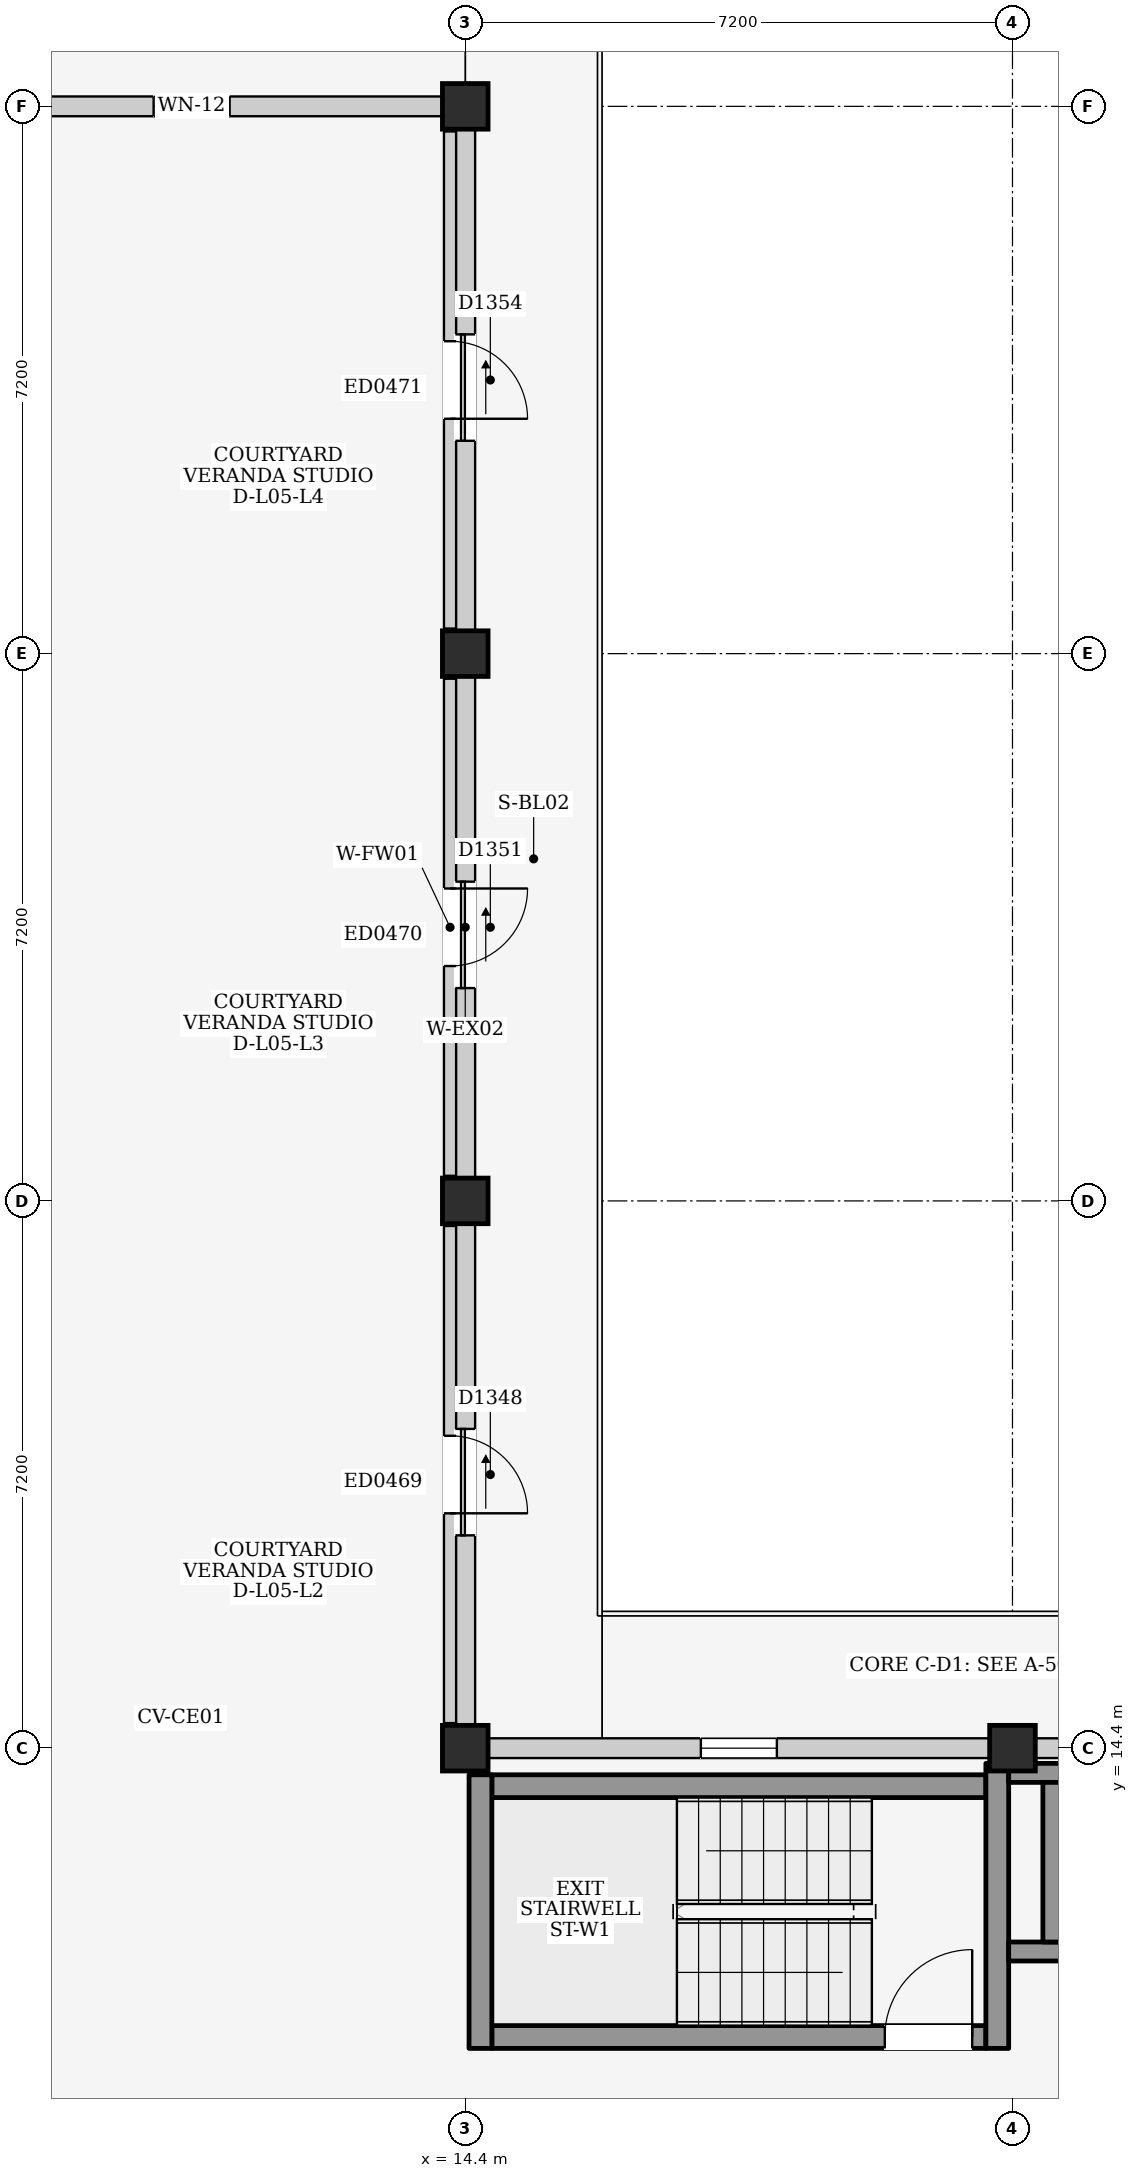
"""IFC4 building model, lengths in metres.
Left out: names, types, materials, properties, quantities, classifications, styles, units other than length and angle.
Written with IfcOpenShell. Run it as: python <this file> out.ifc"""

import sys

from ifc_helpers import new_model, si_unit, direction, frame, frame_2d, origin, origin_2d, place, context, subcontext, project, spatial, rectangle, extrude, element, fill, save


model = new_model("IFC4")
c1 = context("Model", 3, precision=1e-05, world=origin(), true_north=direction((0.0, 1.0)))
c2 = subcontext(c1, "Body", "Model", "MODEL_VIEW")
j1 = project(units=[si_unit("LENGTHUNIT", "METRE"), si_unit("PLANEANGLEUNIT", "RADIAN")], contexts=[c1])
p1 = place(None, origin())
s1 = spatial("IfcSite", under=j1, at=p1, CompositionType="ELEMENT")
p2 = place(p1, origin())
s2 = spatial("IfcBuilding", under=s1, at=p2, CompositionType="ELEMENT")
p3 = place(p2, frame((0.0, 0.0, 18.6)))
s3 = spatial("IfcBuildingStorey", under=s2, at=p3, CompositionType="ELEMENT", Elevation=18.6)
for number, where, z_axis, x_axis in (
    (1, (14.4, 14.4, 0.0), (0.0, 0.0, 1.0), (1.0, 0.0, 0.0)),
    (2, (14.4, 21.6, 0.0), (0.0, 0.0, 1.0), (1.0, 0.0, 0.0)),
    (3, (14.4, 28.8, 0.0), (0.0, 0.0, 1.0), (1.0, 0.0, 0.0)),
    (4, (14.4, 36.0, 0.0), (0.0, 0.0, 1.0), (1.0, 0.0, 0.0)),
    (5, (21.6, 14.4, 0.0), (0.0, 0.0, 1.0), (1.0, 0.0, 0.0)),
):
    element("IfcColumn", number, at=place(p3, frame(where, z_axis=z_axis, x_axis=x_axis)), inside=s3, PredefinedType="COLUMN", context=c2, shape_type="SweptSolid", body=[
        extrude(rectangle(XDim=0.6, YDim=0.6, at=origin_2d()), origin(), (0.0, 0.0, 1.0), 3.3),
    ])
p4 = place(p3, frame((14.4, 14.7, 0.0), z_axis=(0.0, 0.0, 1.0), x_axis=(0.0, 1.0, 0.0)))
e6 = element("IfcWall", 6, at=p4, inside=s3, PredefinedType="ELEMENTEDWALL", context=c2, shape_type="SweptSolid", body=[
    extrude(rectangle(XDim=6.6, YDim=0.26, at=frame_2d((3.3, 0.0))), origin(), (0.0, 0.0, 1.0), 2.545),
])
p5 = place(p4, frame((2.5, 0.0, 0.0)))
e7 = element("IfcOpeningElement", 7, at=p5, cuts=e6, PredefinedType="OPENING", context=c2, shape_type="SweptSolid", body=[
    extrude(rectangle(XDim=1.4, YDim=2.1, at=frame_2d((0.7, 1.05))), frame((0.0, 0.145, 0.0), z_axis=(0.0, -1.0, 0.0), x_axis=(1.0, 0.0, 0.0)), (0.0, 0.0, 1.0), 0.29),
])
p6 = place(p3, frame((14.4, 21.9, 0.0), z_axis=(0.0, 0.0, 1.0), x_axis=(0.0, 1.0, 0.0)))
e8 = element("IfcWall", 8, at=p6, inside=s3, PredefinedType="ELEMENTEDWALL", context=c2, shape_type="SweptSolid", body=[
    extrude(rectangle(XDim=6.6, YDim=0.26, at=frame_2d((3.3, 0.0))), origin(), (0.0, 0.0, 1.0), 2.545),
])
p7 = place(p6, frame((2.5, 0.0, 0.0)))
e9 = element("IfcOpeningElement", 9, at=p7, cuts=e8, PredefinedType="OPENING", context=c2, shape_type="SweptSolid", body=[
    extrude(rectangle(XDim=1.4, YDim=2.1, at=frame_2d((0.7, 1.05))), frame((0.0, 0.145, 0.0), z_axis=(0.0, -1.0, 0.0), x_axis=(1.0, 0.0, 0.0)), (0.0, 0.0, 1.0), 0.29),
])
p8 = place(p3, frame((7.5, 36.0, 0.0), z_axis=(0.0, 0.0, 1.0), x_axis=(1.0, 0.0, 0.0)))
e10 = element("IfcWall", 10, at=p8, inside=s3, PredefinedType="ELEMENTEDWALL", context=c2, shape_type="SweptSolid", body=[
    extrude(rectangle(XDim=6.6, YDim=0.26, at=frame_2d((3.3, 0.0))), origin(), (0.0, 0.0, 1.0), 2.445),
])
p9 = place(p8, frame((2.8, 0.0, 1.1)))
e11 = element("IfcOpeningElement", 11, at=p9, cuts=e10, PredefinedType="OPENING", context=c2, shape_type="SweptSolid", body=[
    extrude(rectangle(XDim=1.0, YDim=0.9, at=frame_2d((0.5, 0.45))), frame((0.0, 0.145, 0.0), z_axis=(0.0, -1.0, 0.0), x_axis=(1.0, 0.0, 0.0)), (0.0, 0.0, 1.0), 0.29),
])
p10 = place(p3, frame((14.4, 29.1, 0.0), z_axis=(0.0, 0.0, 1.0), x_axis=(0.0, 1.0, 0.0)))
e12 = element("IfcWall", 12, at=p10, inside=s3, PredefinedType="ELEMENTEDWALL", context=c2, shape_type="SweptSolid", body=[
    extrude(rectangle(XDim=6.6, YDim=0.26, at=frame_2d((3.3, 0.0))), origin(), (0.0, 0.0, 1.0), 2.545),
])
p11 = place(p10, frame((2.5, 0.0, 0.0)))
e13 = element("IfcOpeningElement", 13, at=p11, cuts=e12, PredefinedType="OPENING", context=c2, shape_type="SweptSolid", body=[
    extrude(rectangle(XDim=1.4, YDim=2.1, at=frame_2d((0.7, 1.05))), frame((0.0, 0.145, 0.0), z_axis=(0.0, -1.0, 0.0), x_axis=(1.0, 0.0, 0.0)), (0.0, 0.0, 1.0), 0.29),
])
p12 = place(p3, frame((14.7, 14.4, 0.0), z_axis=(0.0, 0.0, 1.0), x_axis=(1.0, 0.0, 0.0)))
e14 = element("IfcWall", 14, at=p12, inside=s3, PredefinedType="ELEMENTEDWALL", context=c2, shape_type="SweptSolid", body=[
    extrude(rectangle(XDim=6.6, YDim=0.26, at=frame_2d((3.3, 0.0))), origin(), (0.0, 0.0, 1.0), 2.445),
])
p13 = place(p12, frame((2.8, 0.0, 1.2)))
e15 = element("IfcOpeningElement", 15, at=p13, cuts=e14, PredefinedType="OPENING", context=c2, shape_type="SweptSolid", body=[
    extrude(rectangle(XDim=1.0, YDim=0.9, at=frame_2d((0.5, 0.45))), frame((0.0, 0.145, 0.0), z_axis=(0.0, -1.0, 0.0), x_axis=(1.0, 0.0, 0.0)), (0.0, 0.0, 1.0), 0.29),
])
p14 = place(p3, frame((21.9, 14.4, 0.0), z_axis=(0.0, 0.0, 1.0), x_axis=(1.0, 0.0, 0.0)))
e16 = element("IfcWall", 16, at=p14, inside=s3, PredefinedType="ELEMENTEDWALL", context=c2, shape_type="SweptSolid", body=[
    extrude(rectangle(XDim=6.6, YDim=0.26, at=frame_2d((3.3, 0.0))), origin(), (0.0, 0.0, 1.0), 2.445),
])
p15 = place(p14, frame((2.8, 0.0, 1.2)))
e17 = element("IfcOpeningElement", 17, at=p15, cuts=e16, PredefinedType="OPENING", context=c2, shape_type="SweptSolid", body=[
    extrude(rectangle(XDim=1.0, YDim=0.9, at=frame_2d((0.5, 0.45))), frame((0.0, 0.145, 0.0), z_axis=(0.0, -1.0, 0.0), x_axis=(1.0, 0.0, 0.0)), (0.0, 0.0, 1.0), 0.29),
])
p16 = place(p3, frame((14.75, 10.6, 0.0), z_axis=(0.0, 0.0, 1.0), x_axis=(1.0, 0.0, 0.0)))
e18 = element("IfcWall", 18, at=p16, inside=s3, PredefinedType="SHEAR", context=c2, shape_type="SweptSolid", body=[
    extrude(rectangle(XDim=6.5, YDim=0.3, at=frame_2d((3.25, 0.0))), origin(), (0.0, 0.0, 1.0), 3.06),
])
p17 = place(p16, frame((5.17, 0.0, 0.0)))
e19 = element("IfcOpeningElement", 19, at=p17, cuts=e18, PredefinedType="OPENING", context=c2, shape_type="SweptSolid", body=[
    extrude(rectangle(XDim=1.15, YDim=2.2, at=frame_2d((0.575, 1.1))), frame((0.0, 0.165, 0.0), z_axis=(0.0, -1.0, 0.0), x_axis=(1.0, 0.0, 0.0)), (0.0, 0.0, 1.0), 0.33),
])
p18 = place(p3, frame((14.75, 13.9, 0.0), z_axis=(0.0, 0.0, 1.0), x_axis=(1.0, 0.0, 0.0)))
e20 = element("IfcWall", 20, at=p18, inside=s3, PredefinedType="SHEAR", context=c2, shape_type="SweptSolid", body=[
    extrude(rectangle(XDim=6.5, YDim=0.3, at=frame_2d((3.25, 0.0))), origin(), (0.0, 0.0, 1.0), 3.06),
])
p19 = place(p3, frame((14.6, 10.45, 0.0), z_axis=(0.0, 0.0, 1.0), x_axis=(0.0, 1.0, 0.0)))
e21 = element("IfcWall", 21, at=p19, inside=s3, PredefinedType="SHEAR", context=c2, shape_type="SweptSolid", body=[
    extrude(rectangle(XDim=3.6, YDim=0.3, at=frame_2d((1.8, 0.0))), origin(), (0.0, 0.0, 1.0), 3.06),
])
p20 = place(p3, frame((21.4, 10.45, 0.0), z_axis=(0.0, 0.0, 1.0), x_axis=(0.0, 1.0, 0.0)))
e22 = element("IfcWall", 22, at=p20, inside=s3, PredefinedType="SHEAR", context=c2, shape_type="SweptSolid", body=[
    extrude(rectangle(XDim=3.75, YDim=0.3, at=frame_2d((1.875, 0.0))), origin(), (0.0, 0.0, 1.0), 3.06),
])
p21 = place(p3, frame((21.55, 11.725, 0.0), z_axis=(0.0, 0.0, 1.0), x_axis=(1.0, 0.0, 0.0)))
e23 = element("IfcWall", 23, at=p21, inside=s3, PredefinedType="SHEAR", context=c2, shape_type="SweptSolid", body=[
    extrude(rectangle(XDim=2.55, YDim=0.25, at=frame_2d((1.275, 0.0))), origin(), (0.0, 0.0, 1.0), 3.06),
])
p22 = place(p21, frame((0.95, 0.0, 0.0)))
e24 = element("IfcOpeningElement", 24, at=p22, cuts=e23, PredefinedType="OPENING", context=c2, shape_type="SweptSolid", body=[
    extrude(rectangle(XDim=1.1, YDim=2.15, at=frame_2d((0.55, 1.075))), frame((0.0, 0.14, 0.0), z_axis=(0.0, -1.0, 0.0), x_axis=(1.0, 0.0, 0.0)), (0.0, 0.0, 1.0), 0.28),
])
p23 = place(p3, frame((21.55, 14.075, 0.0), z_axis=(0.0, 0.0, 1.0), x_axis=(1.0, 0.0, 0.0)))
e25 = element("IfcWall", 25, at=p23, inside=s3, PredefinedType="SHEAR", context=c2, shape_type="SweptSolid", body=[
    extrude(rectangle(XDim=2.55, YDim=0.25, at=frame_2d((1.275, 0.0))), origin(), (0.0, 0.0, 1.0), 3.06),
])
p24 = place(p3, frame((22.125, 11.85, 0.0), z_axis=(0.0, 0.0, 1.0), x_axis=(0.0, 1.0, 0.0)))
e26 = element("IfcWall", 26, at=p24, inside=s3, PredefinedType="SHEAR", context=c2, shape_type="SweptSolid", body=[
    extrude(rectangle(XDim=2.1, YDim=0.25, at=frame_2d((1.05, 0.0))), origin(), (0.0, 0.0, 1.0), 3.06),
])
p25 = place(p3, frame((14.2, 14.73, 0.0), z_axis=(0.0, 0.0, 1.0), x_axis=(0.0, 1.0, 0.0)))
e27 = element("IfcWall", 27, at=p25, inside=s3, PredefinedType="PARTITIONING", context=c2, shape_type="SweptSolid", body=[
    extrude(rectangle(XDim=6.54, YDim=0.16, at=frame_2d((3.27, 0.0))), origin(), (0.0, 0.0, 1.0), 3.06),
])
p26 = place(p25, frame((2.76, 0.0, 0.0)))
e28 = element("IfcOpeningElement", 28, at=p26, cuts=e27, PredefinedType="OPENING", context=c2, shape_type="SweptSolid", body=[
    extrude(rectangle(XDim=1.02, YDim=2.18, at=frame_2d((0.51, 1.09))), frame((0.0, 0.095, 0.0), z_axis=(0.0, -1.0, 0.0), x_axis=(1.0, 0.0, 0.0)), (0.0, 0.0, 1.0), 0.19),
])
p27 = place(p3, frame((14.2, 21.93, 0.0), z_axis=(0.0, 0.0, 1.0), x_axis=(0.0, 1.0, 0.0)))
e29 = element("IfcWall", 29, at=p27, inside=s3, PredefinedType="PARTITIONING", context=c2, shape_type="SweptSolid", body=[
    extrude(rectangle(XDim=6.54, YDim=0.16, at=frame_2d((3.27, 0.0))), origin(), (0.0, 0.0, 1.0), 3.06),
])
p28 = place(p27, frame((2.76, 0.0, 0.0)))
e30 = element("IfcOpeningElement", 30, at=p28, cuts=e29, PredefinedType="OPENING", context=c2, shape_type="SweptSolid", body=[
    extrude(rectangle(XDim=1.02, YDim=2.18, at=frame_2d((0.51, 1.09))), frame((0.0, 0.095, 0.0), z_axis=(0.0, -1.0, 0.0), x_axis=(1.0, 0.0, 0.0)), (0.0, 0.0, 1.0), 0.19),
])
p29 = place(p3, frame((14.2, 29.13, 0.0), z_axis=(0.0, 0.0, 1.0), x_axis=(0.0, 1.0, 0.0)))
e31 = element("IfcWall", 31, at=p29, inside=s3, PredefinedType="PARTITIONING", context=c2, shape_type="SweptSolid", body=[
    extrude(rectangle(XDim=6.54, YDim=0.16, at=frame_2d((3.27, 0.0))), origin(), (0.0, 0.0, 1.0), 3.06),
])
p30 = place(p29, frame((2.76, 0.0, 0.0)))
e32 = element("IfcOpeningElement", 32, at=p30, cuts=e31, PredefinedType="OPENING", context=c2, shape_type="SweptSolid", body=[
    extrude(rectangle(XDim=1.02, YDim=2.18, at=frame_2d((0.51, 1.09))), frame((0.0, 0.095, 0.0), z_axis=(0.0, -1.0, 0.0), x_axis=(1.0, 0.0, 0.0)), (0.0, 0.0, 1.0), 0.19),
])
p31 = place(p5, frame((1.4, 0.0, 0.0), z_axis=(0.0, 0.0, 1.0), x_axis=(-1.0, 0.0, 0.0)))
e33 = element("IfcDoor", 33, at=p31, inside=s3, OperationType="SLIDING_TO_RIGHT", PredefinedType="DOOR", context=c2, shape_type="SweptSolid", body=[
    extrude(rectangle(XDim=1.4, YDim=2.1, at=frame_2d((0.7, 1.05))), frame((0.0, 0.025, 0.0), z_axis=(0.0, -1.0, 0.0), x_axis=(1.0, 0.0, 0.0)), (0.0, 0.0, 1.0), 0.05),
])
fill(e7, e33)
p32 = place(p7, frame((1.4, 0.0, 0.0), z_axis=(0.0, 0.0, 1.0), x_axis=(-1.0, 0.0, 0.0)))
e34 = element("IfcDoor", 34, at=p32, inside=s3, OperationType="SLIDING_TO_RIGHT", PredefinedType="DOOR", context=c2, shape_type="SweptSolid", body=[
    extrude(rectangle(XDim=1.4, YDim=2.1, at=frame_2d((0.7, 1.05))), frame((0.0, 0.025, 0.0), z_axis=(0.0, -1.0, 0.0), x_axis=(1.0, 0.0, 0.0)), (0.0, 0.0, 1.0), 0.05),
])
fill(e9, e34)
p33 = place(p9, origin())
e35 = element("IfcWindow", 35, at=p33, inside=s3, PartitioningType="SINGLE_PANEL", PredefinedType="WINDOW", context=c2, shape_type="SweptSolid", body=[
    extrude(rectangle(XDim=1.0, YDim=0.9, at=frame_2d((0.5, 0.45))), frame((0.0, 0.03, 0.0), z_axis=(0.0, -1.0, 0.0), x_axis=(1.0, 0.0, 0.0)), (0.0, 0.0, 1.0), 0.06),
])
fill(e11, e35)
p34 = place(p11, frame((1.4, 0.0, 0.0), z_axis=(0.0, 0.0, 1.0), x_axis=(-1.0, 0.0, 0.0)))
e36 = element("IfcDoor", 36, at=p34, inside=s3, OperationType="SLIDING_TO_RIGHT", PredefinedType="DOOR", context=c2, shape_type="SweptSolid", body=[
    extrude(rectangle(XDim=1.4, YDim=2.1, at=frame_2d((0.7, 1.05))), frame((0.0, 0.025, 0.0), z_axis=(0.0, -1.0, 0.0), x_axis=(1.0, 0.0, 0.0)), (0.0, 0.0, 1.0), 0.05),
])
fill(e13, e36)
p35 = place(p13, origin())
e37 = element("IfcWindow", 37, at=p35, inside=s3, PartitioningType="SINGLE_PANEL", PredefinedType="WINDOW", context=c2, shape_type="SweptSolid", body=[
    extrude(rectangle(XDim=1.0, YDim=0.9, at=frame_2d((0.5, 0.45))), frame((0.0, 0.03, 0.0), z_axis=(0.0, -1.0, 0.0), x_axis=(1.0, 0.0, 0.0)), (0.0, 0.0, 1.0), 0.06),
])
fill(e15, e37)
p36 = place(p17, origin())
e38 = element("IfcDoor", 38, at=p36, inside=s3, OperationType="SINGLE_SWING_RIGHT", PredefinedType="DOOR", context=c2, shape_type="SweptSolid", body=[
    extrude(rectangle(XDim=1.15, YDim=2.2, at=frame_2d((0.575, 1.1))), frame((0.0, 0.025, 0.0), z_axis=(0.0, -1.0, 0.0), x_axis=(1.0, 0.0, 0.0)), (0.0, 0.0, 1.0), 0.05),
])
fill(e19, e38)
p37 = place(p26, frame((1.02, 0.0, 0.0), z_axis=(0.0, 0.0, 1.0), x_axis=(-1.0, 0.0, 0.0)))
e39 = element("IfcDoor", 39, at=p37, inside=s3, OperationType="SINGLE_SWING_RIGHT", PredefinedType="DOOR", context=c2, shape_type="SweptSolid", body=[
    extrude(rectangle(XDim=1.02, YDim=2.18, at=frame_2d((0.51, 1.09))), frame((0.0, 0.025, 0.0), z_axis=(0.0, -1.0, 0.0), x_axis=(1.0, 0.0, 0.0)), (0.0, 0.0, 1.0), 0.05),
])
fill(e28, e39)
p38 = place(p28, frame((1.02, 0.0, 0.0), z_axis=(0.0, 0.0, 1.0), x_axis=(-1.0, 0.0, 0.0)))
e40 = element("IfcDoor", 40, at=p38, inside=s3, OperationType="SINGLE_SWING_LEFT", PredefinedType="DOOR", context=c2, shape_type="SweptSolid", body=[
    extrude(rectangle(XDim=1.02, YDim=2.18, at=frame_2d((0.51, 1.09))), frame((0.0, 0.025, 0.0), z_axis=(0.0, -1.0, 0.0), x_axis=(1.0, 0.0, 0.0)), (0.0, 0.0, 1.0), 0.05),
])
fill(e30, e40)
p39 = place(p30, frame((1.02, 0.0, 0.0), z_axis=(0.0, 0.0, 1.0), x_axis=(-1.0, 0.0, 0.0)))
e41 = element("IfcDoor", 41, at=p39, inside=s3, OperationType="SINGLE_SWING_RIGHT", PredefinedType="DOOR", context=c2, shape_type="SweptSolid", body=[
    extrude(rectangle(XDim=1.02, YDim=2.18, at=frame_2d((0.51, 1.09))), frame((0.0, 0.025, 0.0), z_axis=(0.0, -1.0, 0.0), x_axis=(1.0, 0.0, 0.0)), (0.0, 0.0, 1.0), 0.05),
])
fill(e32, e41)
save(model, sys.argv[1])
